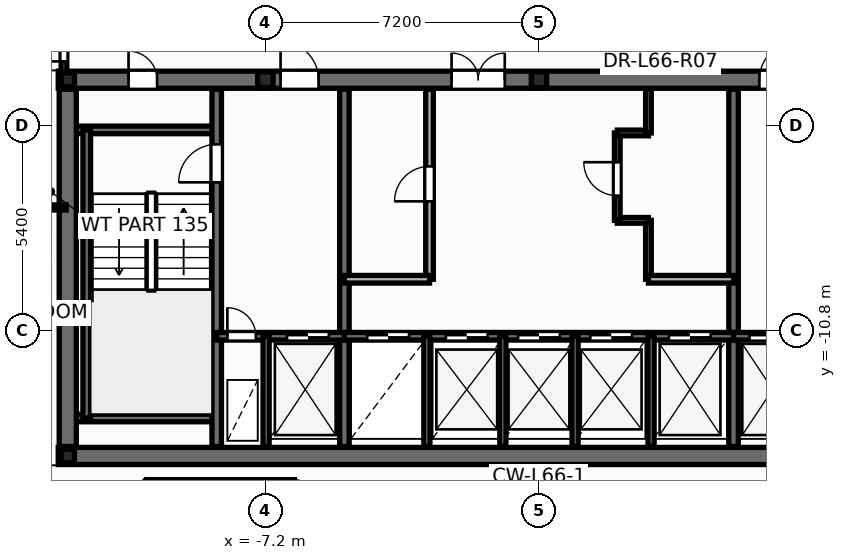
"""IFC4 building model, lengths in metres.
Left out: names, types, materials, properties, quantities, classifications, styles, units other than length and angle.
Written with IfcOpenShell. Run it as: python <this file> out.ifc"""

import sys

from ifc_helpers import new_model, si_unit, direction, frame, frame_2d, origin, origin_2d, place, context, subcontext, project, spatial, rectangle, i_section, extrude, element, fill, save


model = new_model("IFC4")
c1 = context("Model", 3, precision=1e-05, world=origin(), true_north=direction((0.0, 1.0)))
c2 = subcontext(c1, "Body", "Model", "MODEL_VIEW")
j1 = project(units=[si_unit("LENGTHUNIT", "METRE"), si_unit("PLANEANGLEUNIT", "RADIAN")], contexts=[c1])
p1 = place(None, origin())
s1 = spatial("IfcSite", under=j1, at=p1, CompositionType="ELEMENT")
p2 = place(p1, origin())
s2 = spatial("IfcBuilding", under=s1, at=p2, CompositionType="ELEMENT")
p3 = place(p2, frame((0.0, 0.0, 252.6)))
s3 = spatial("IfcBuildingStorey", under=s2, at=p3, CompositionType="ELEMENT", Elevation=252.6)
for number, where, z_axis, x_axis in (
    (1, (-12.4, -14.1, 0.0), (0.0, 0.0, 1.0), (1.0, 0.0, 0.0)),
    (2, (-12.4, -4.2, 0.0), (0.0, 0.0, 1.0), (1.0, 0.0, 0.0)),
):
    element("IfcColumn", number, at=place(p3, frame(where, z_axis=z_axis, x_axis=x_axis)), inside=s3, PredefinedType="COLUMN", context=c2, shape_type="SweptSolid", body=[
        extrude(i_section(OverallWidth=0.352, OverallDepth=0.359, WebThickness=0.018, FlangeThickness=0.026, at=origin_2d()), origin(), (0.0, 0.0, 1.0), 3.6),
    ])
for number, where, z_axis, x_axis in (
    (3, (-7.2, -4.2, 0.0), (0.0, 0.0, 1.0), (1.0, 0.0, 0.0)),
    (4, (0.0, -4.2, 0.0), (0.0, 0.0, 1.0), (1.0, 0.0, 0.0)),
):
    element("IfcColumn", number, at=place(p3, frame(where, z_axis=z_axis, x_axis=x_axis)), inside=s3, PredefinedType="PILASTER", context=c2, shape_type="SweptSolid", body=[
        extrude(i_section(OverallWidth=0.405, OverallDepth=0.414, WebThickness=0.022, FlangeThickness=0.032, at=origin_2d()), origin(), (0.0, 0.0, 1.0), 3.6),
    ])
p4 = place(p3, frame((2.88, -9.45, 0.0), z_axis=(0.0, 0.0, 1.0), x_axis=(0.0, 1.0, 0.0)))
e5 = element("IfcWall", 5, at=p4, inside=s3, PredefinedType="PARTITIONING", context=c2, shape_type="SweptSolid", body=[
    extrude(rectangle(XDim=1.55, YDim=0.15, at=frame_2d((0.775, 0.0))), origin(), (0.0, 0.0, 1.0), 3.345),
])
p5 = place(p3, frame((2.06, -7.9, 0.0), z_axis=(0.0, 0.0, 1.0), x_axis=(1.0, 0.0, 0.0)))
e6 = element("IfcWall", 6, at=p5, inside=s3, PredefinedType="PARTITIONING", context=c2, shape_type="SweptSolid", body=[
    extrude(rectangle(XDim=0.82, YDim=0.15, at=frame_2d((0.41, 0.0))), origin(), (0.0, 0.0, 1.0), 3.345),
])
p6 = place(p3, frame((2.06, -7.9, 0.0), z_axis=(0.0, 0.0, 1.0), x_axis=(0.0, 1.0, 0.0)))
e7 = element("IfcWall", 7, at=p6, inside=s3, PredefinedType="PARTITIONING", context=c2, shape_type="SweptSolid", body=[
    extrude(rectangle(XDim=2.3, YDim=0.15, at=frame_2d((1.15, 0.0))), origin(), (0.0, 0.0, 1.0), 3.345),
])
p7 = place(p6, frame((0.65, 0.0, 0.0)))
e8 = element("IfcOpeningElement", 8, at=p7, cuts=e7, PredefinedType="OPENING", context=c2, shape_type="SweptSolid", body=[
    extrude(rectangle(XDim=0.886, YDim=2.104, at=frame_2d((0.44, 1.052))), frame((0.0, 0.085, 0.0), z_axis=(0.0, -1.0, 0.0), x_axis=(1.0, 0.0, 0.0)), (0.0, 0.0, 1.0), 0.17),
])
p8 = place(p3, frame((2.06, -5.6, 0.0), z_axis=(0.0, 0.0, 1.0), x_axis=(1.0, 0.0, 0.0)))
e9 = element("IfcWall", 9, at=p8, inside=s3, PredefinedType="PARTITIONING", context=c2, shape_type="SweptSolid", body=[
    extrude(rectangle(XDim=0.82, YDim=0.15, at=frame_2d((0.41, 0.0))), origin(), (0.0, 0.0, 1.0), 3.345),
])
p9 = place(p3, frame((2.88, -5.6, 0.0), z_axis=(0.0, 0.0, 1.0), x_axis=(0.0, 1.0, 0.0)))
e10 = element("IfcWall", 10, at=p9, inside=s3, PredefinedType="PARTITIONING", context=c2, shape_type="SweptSolid", body=[
    extrude(rectangle(XDim=1.15, YDim=0.15, at=frame_2d((0.575, 0.0))), origin(), (0.0, 0.0, 1.0), 3.345),
])
p10 = place(p3, frame((-12.65, -14.1, 0.0), z_axis=(0.0, 0.0, 1.0), x_axis=(1.0, 0.0, 0.0)))
e11 = element("IfcWall", 11, at=p10, inside=s3, PredefinedType="SHEAR", context=c2, shape_type="SweptSolid", body=[
    extrude(rectangle(XDim=25.3, YDim=0.45, at=frame_2d((12.65, 0.0))), origin(), (0.0, 0.0, 1.0), 3.6),
])
p11 = place(p3, frame((-12.65, -4.2, 0.0), z_axis=(0.0, 0.0, 1.0), x_axis=(1.0, 0.0, 0.0)))
e12 = element("IfcWall", 12, at=p11, inside=s3, PredefinedType="SHEAR", context=c2, shape_type="SweptSolid", body=[
    extrude(rectangle(XDim=25.3, YDim=0.45, at=frame_2d((12.65, 0.0))), origin(), (0.0, 0.0, 1.0), 3.6),
])
p12 = place(p11, frame((1.85, 0.0, 0.0)))
e13 = element("IfcOpeningElement", 13, at=p12, cuts=e12, PredefinedType="OPENING", context=c2, shape_type="SweptSolid", body=[
    extrude(rectangle(XDim=0.756, YDim=2.054, at=frame_2d((0.375, 1.027))), frame((0.0, 0.235, 0.0), z_axis=(0.0, -1.0, 0.0), x_axis=(1.0, 0.0, 0.0)), (0.0, 0.0, 1.0), 0.47),
])
p13 = place(p11, frame((22.65, 0.0, 0.0)))
e14 = element("IfcOpeningElement", 14, at=p13, cuts=e12, PredefinedType="OPENING", context=c2, shape_type="SweptSolid", body=[
    extrude(rectangle(XDim=0.756, YDim=2.054, at=frame_2d((0.375, 1.027))), frame((0.0, 0.235, 0.0), z_axis=(0.0, -1.0, 0.0), x_axis=(1.0, 0.0, 0.0)), (0.0, 0.0, 1.0), 0.47),
])
p14 = place(p11, frame((5.85, 0.0, 0.0)))
e15 = element("IfcOpeningElement", 15, at=p14, cuts=e12, PredefinedType="OPENING", context=c2, shape_type="SweptSolid", body=[
    extrude(rectangle(XDim=1.006, YDim=2.104, at=frame_2d((0.5, 1.052))), frame((0.0, 0.235, 0.0), z_axis=(0.0, -1.0, 0.0), x_axis=(1.0, 0.0, 0.0)), (0.0, 0.0, 1.0), 0.47),
])
p15 = place(p11, frame((10.35, 0.0, 0.0)))
e16 = element("IfcOpeningElement", 16, at=p15, cuts=e12, PredefinedType="OPENING", context=c2, shape_type="SweptSolid", body=[
    extrude(rectangle(XDim=1.406, YDim=2.154, at=frame_2d((0.7, 1.077))), frame((0.0, 0.235, 0.0), z_axis=(0.0, -1.0, 0.0), x_axis=(1.0, 0.0, 0.0)), (0.0, 0.0, 1.0), 0.47),
])
p16 = place(p11, frame((18.45, 0.0, 0.0)))
e17 = element("IfcOpeningElement", 17, at=p16, cuts=e12, PredefinedType="OPENING", context=c2, shape_type="SweptSolid", body=[
    extrude(rectangle(XDim=1.006, YDim=2.104, at=frame_2d((0.5, 1.052))), frame((0.0, 0.235, 0.0), z_axis=(0.0, -1.0, 0.0), x_axis=(1.0, 0.0, 0.0)), (0.0, 0.0, 1.0), 0.47),
])
for number, where, z_axis, x_axis in (
    (18, (-12.35, -5.52, 0.0), (0.0, 0.0, 1.0), (1.0, 0.0, 0.0)),
    (19, (-12.35, -13.1, 0.0), (0.0, 0.0, 1.0), (1.0, 0.0, 0.0)),
):
    element("IfcWall", number, at=place(p3, frame(where, z_axis=z_axis, x_axis=x_axis)), inside=s3, PredefinedType="SOLIDWALL", context=c2, shape_type="SweptSolid", body=[
        extrude(rectangle(XDim=3.87, YDim=0.2, at=frame_2d((1.935, 0.0))), origin(), (0.0, 0.0, 1.0), 3.6),
    ])
p17 = place(p3, frame((-11.9, -13.1, 0.0), z_axis=(0.0, 0.0, 1.0), x_axis=(0.0, 1.0, 0.0)))
e20 = element("IfcWall", 20, at=p17, inside=s3, PredefinedType="SOLIDWALL", context=c2, shape_type="SweptSolid", body=[
    extrude(rectangle(XDim=7.58, YDim=0.2, at=frame_2d((3.79, 0.0))), origin(), (0.0, 0.0, 1.0), 3.6),
])
p18 = place(p3, frame((-8.48, -13.85, 0.0), z_axis=(0.0, 0.0, 1.0), x_axis=(0.0, 1.0, 0.0)))
e21 = element("IfcWall", 21, at=p18, inside=s3, PredefinedType="SHEAR", context=c2, shape_type="SweptSolid", body=[
    extrude(rectangle(XDim=9.4, YDim=0.25, at=frame_2d((4.7, 0.0))), origin(), (0.0, 0.0, 1.0), 3.6),
])
p19 = place(p18, frame((6.95, 0.0, 0.0)))
e22 = element("IfcOpeningElement", 22, at=p19, cuts=e21, PredefinedType="OPENING", context=c2, shape_type="SweptSolid", body=[
    extrude(rectangle(XDim=1.006, YDim=2.104, at=frame_2d((0.5, 1.052))), frame((0.0, 0.135, 0.0), z_axis=(0.0, -1.0, 0.0), x_axis=(1.0, 0.0, 0.0)), (0.0, 0.0, 1.0), 0.27),
])
for number, where, z_axis, x_axis in (
    (23, (-5.12, -13.85, 0.0), (0.0, 0.0, 1.0), (0.0, 1.0, 0.0)),
    (24, (5.12, -13.85, 0.0), (0.0, 0.0, 1.0), (0.0, 1.0, 0.0)),
):
    element("IfcWall", number, at=place(p3, frame(where, z_axis=z_axis, x_axis=x_axis)), inside=s3, PredefinedType="SHEAR", context=c2, shape_type="SweptSolid", body=[
        extrude(rectangle(XDim=9.4, YDim=0.25, at=frame_2d((4.7, 0.0))), origin(), (0.0, 0.0, 1.0), 3.6),
    ])
p20 = place(p3, frame((-8.48, -10.95, 0.0), z_axis=(0.0, 0.0, 1.0), x_axis=(1.0, 0.0, 0.0)))
e25 = element("IfcWall", 25, at=p20, inside=s3, PredefinedType="SOLIDWALL", context=c2, shape_type="SweptSolid", body=[
    extrude(rectangle(XDim=3.36, YDim=0.2, at=frame_2d((1.68, 0.0))), origin(), (0.0, 0.0, 1.0), 3.6),
])
p21 = place(p20, frame((0.28, 0.0, 0.0)))
e26 = element("IfcOpeningElement", 26, at=p21, cuts=e25, PredefinedType="OPENING", context=c2, shape_type="SweptSolid", body=[
    extrude(rectangle(XDim=0.756, YDim=2.054, at=frame_2d((0.375, 1.027))), frame((0.0, 0.11, 0.0), z_axis=(0.0, -1.0, 0.0), x_axis=(1.0, 0.0, 0.0)), (0.0, 0.0, 1.0), 0.22),
])
p22 = place(p20, frame((1.85, 0.0, 0.0)))
e27 = element("IfcOpeningElement", 27, at=p22, cuts=e25, PredefinedType="OPENING", context=c2, shape_type="SweptSolid", body=[
    extrude(rectangle(XDim=1.106, YDim=2.104, at=frame_2d((0.55, 1.052))), frame((0.0, 0.11, 0.0), z_axis=(0.0, -1.0, 0.0), x_axis=(1.0, 0.0, 0.0)), (0.0, 0.0, 1.0), 0.22),
])
p23 = place(p3, frame((-5.12, -10.95, 0.0), z_axis=(0.0, 0.0, 1.0), x_axis=(1.0, 0.0, 0.0)))
e28 = element("IfcWall", 28, at=p23, inside=s3, PredefinedType="SOLIDWALL", context=c2, shape_type="SweptSolid", body=[
    extrude(rectangle(XDim=10.24, YDim=0.2, at=frame_2d((5.12, 0.0))), origin(), (0.0, 0.0, 1.0), 3.6),
])
p24 = place(p23, frame((0.6, 0.0, 0.0)))
e29 = element("IfcOpeningElement", 29, at=p24, cuts=e28, PredefinedType="OPENING", context=c2, shape_type="SweptSolid", body=[
    extrude(rectangle(XDim=1.106, YDim=2.104, at=frame_2d((0.55, 1.052))), frame((0.0, 0.11, 0.0), z_axis=(0.0, -1.0, 0.0), x_axis=(1.0, 0.0, 0.0)), (0.0, 0.0, 1.0), 0.22),
])
p25 = place(p23, frame((2.67, 0.0, 0.0)))
e30 = element("IfcOpeningElement", 30, at=p25, cuts=e28, PredefinedType="OPENING", context=c2, shape_type="SweptSolid", body=[
    extrude(rectangle(XDim=1.106, YDim=2.104, at=frame_2d((0.55, 1.052))), frame((0.0, 0.11, 0.0), z_axis=(0.0, -1.0, 0.0), x_axis=(1.0, 0.0, 0.0)), (0.0, 0.0, 1.0), 0.22),
])
p26 = place(p23, frame((4.57, 0.0, 0.0)))
e31 = element("IfcOpeningElement", 31, at=p26, cuts=e28, PredefinedType="OPENING", context=c2, shape_type="SweptSolid", body=[
    extrude(rectangle(XDim=1.106, YDim=2.104, at=frame_2d((0.55, 1.052))), frame((0.0, 0.11, 0.0), z_axis=(0.0, -1.0, 0.0), x_axis=(1.0, 0.0, 0.0)), (0.0, 0.0, 1.0), 0.22),
])
p27 = place(p23, frame((6.47, 0.0, 0.0)))
e32 = element("IfcOpeningElement", 32, at=p27, cuts=e28, PredefinedType="OPENING", context=c2, shape_type="SweptSolid", body=[
    extrude(rectangle(XDim=1.106, YDim=2.104, at=frame_2d((0.55, 1.052))), frame((0.0, 0.11, 0.0), z_axis=(0.0, -1.0, 0.0), x_axis=(1.0, 0.0, 0.0)), (0.0, 0.0, 1.0), 0.22),
])
p28 = place(p23, frame((8.54, 0.0, 0.0)))
e33 = element("IfcOpeningElement", 33, at=p28, cuts=e28, PredefinedType="OPENING", context=c2, shape_type="SweptSolid", body=[
    extrude(rectangle(XDim=1.106, YDim=2.104, at=frame_2d((0.55, 1.052))), frame((0.0, 0.11, 0.0), z_axis=(0.0, -1.0, 0.0), x_axis=(1.0, 0.0, 0.0)), (0.0, 0.0, 1.0), 0.22),
])
p29 = place(p3, frame((5.12, -10.95, 0.0), z_axis=(0.0, 0.0, 1.0), x_axis=(1.0, 0.0, 0.0)))
e34 = element("IfcWall", 34, at=p29, inside=s3, PredefinedType="SOLIDWALL", context=c2, shape_type="SweptSolid", body=[
    extrude(rectangle(XDim=3.36, YDim=0.2, at=frame_2d((1.68, 0.0))), origin(), (0.0, 0.0, 1.0), 3.6),
])
p30 = place(p29, frame((0.42, 0.0, 0.0)))
e35 = element("IfcOpeningElement", 35, at=p30, cuts=e34, PredefinedType="OPENING", context=c2, shape_type="SweptSolid", body=[
    extrude(rectangle(XDim=1.106, YDim=2.104, at=frame_2d((0.55, 1.052))), frame((0.0, 0.11, 0.0), z_axis=(0.0, -1.0, 0.0), x_axis=(1.0, 0.0, 0.0)), (0.0, 0.0, 1.0), 0.22),
])
p31 = place(p29, frame((2.3, 0.0, 0.0)))
e36 = element("IfcOpeningElement", 36, at=p31, cuts=e34, PredefinedType="OPENING", context=c2, shape_type="SweptSolid", body=[
    extrude(rectangle(XDim=0.756, YDim=2.054, at=frame_2d((0.375, 1.027))), frame((0.0, 0.11, 0.0), z_axis=(0.0, -1.0, 0.0), x_axis=(1.0, 0.0, 0.0)), (0.0, 0.0, 1.0), 0.22),
])
for number, where, z_axis, x_axis in (
    (37, (-7.18, -13.85, 0.0), (0.0, 0.0, 1.0), (0.0, 1.0, 0.0)),
    (38, (-2.95, -13.85, 0.0), (0.0, 0.0, 1.0), (0.0, 1.0, 0.0)),
    (39, (2.95, -13.85, 0.0), (0.0, 0.0, 1.0), (0.0, 1.0, 0.0)),
):
    element("IfcWall", number, at=place(p3, frame(where, z_axis=z_axis, x_axis=x_axis)), inside=s3, PredefinedType="PARTITIONING", context=c2, shape_type="SweptSolid", body=[
        extrude(rectangle(XDim=2.9, YDim=0.16, at=frame_2d((1.45, 0.0))), origin(), (0.0, 0.0, 1.0), 2.57),
    ])
p32 = place(p3, frame((-12.4, -13.85, 0.0), z_axis=(0.0, 0.0, 1.0), x_axis=(0.0, 1.0, 0.0)))
e40 = element("IfcWall", 40, at=p32, inside=s3, PredefinedType="SHEAR", context=c2, shape_type="SweptSolid", body=[
    extrude(rectangle(XDim=9.4, YDim=0.45, at=frame_2d((4.7, 0.0))), origin(), (0.0, 0.0, 1.0), 3.6),
])
p33 = place(p3, frame((-2.88, -9.45, 0.0), z_axis=(0.0, 0.0, 1.0), x_axis=(0.0, 1.0, 0.0)))
e41 = element("IfcWall", 41, at=p33, inside=s3, PredefinedType="SOLIDWALL", context=c2, shape_type="SweptSolid", body=[
    extrude(rectangle(XDim=5.0, YDim=0.2, at=frame_2d((2.5, 0.0))), origin(), (0.0, 0.0, 1.0), 3.345),
])
p34 = place(p33, frame((2.05, 0.0, 0.0)))
e42 = element("IfcOpeningElement", 42, at=p34, cuts=e41, PredefinedType="OPENING", context=c2, shape_type="SweptSolid", body=[
    extrude(rectangle(XDim=0.926, YDim=2.104, at=frame_2d((0.46, 1.052))), frame((0.0, 0.11, 0.0), z_axis=(0.0, -1.0, 0.0), x_axis=(1.0, 0.0, 0.0)), (0.0, 0.0, 1.0), 0.22),
])
for number, where, z_axis, x_axis in (
    (43, (-5.12, -9.45, 0.0), (0.0, 0.0, 1.0), (1.0, 0.0, 0.0)),
    (44, (2.88, -9.45, 0.0), (0.0, 0.0, 1.0), (1.0, 0.0, 0.0)),
):
    element("IfcWall", number, at=place(p3, frame(where, z_axis=z_axis, x_axis=x_axis)), inside=s3, PredefinedType="SOLIDWALL", context=c2, shape_type="SweptSolid", body=[
        extrude(rectangle(XDim=2.24, YDim=0.2, at=frame_2d((1.12, 0.0))), origin(), (0.0, 0.0, 1.0), 3.345),
    ])
for number, where, z_axis, x_axis in (
    (45, (-0.95, -13.85, 0.0), (0.0, 0.0, 1.0), (0.0, 1.0, 0.0)),
    (46, (0.95, -13.85, 0.0), (0.0, 0.0, 1.0), (0.0, 1.0, 0.0)),
):
    element("IfcWall", number, at=place(p3, frame(where, z_axis=z_axis, x_axis=x_axis)), inside=s3, PredefinedType="PARTITIONING", context=c2, shape_type="SweptSolid", body=[
        extrude(rectangle(XDim=2.9, YDim=0.16, at=frame_2d((1.45, 0.0))), origin(), (0.0, 0.0, 1.0), 2.57),
    ])
p35 = place(p3, frame((-10.321, -14.783, 0.0), z_axis=(0.0, 0.0, 1.0), x_axis=(1.0, 0.0, 0.0)))
e47 = element("IfcWall", 47, at=p35, inside=s3, PredefinedType="PARTITIONING", context=c2, shape_type="SweptSolid", body=[
    extrude(rectangle(XDim=3.886, YDim=0.12, at=frame_2d((1.943, 0.0))), origin(), (0.0, 0.0, 1.0), 3.345),
])
p36 = place(p3, frame((-15.2, -7.56, 0.0), z_axis=(0.0, 0.0, 1.0), x_axis=(1.0, 0.0, 0.0)))
e48 = element("IfcWall", 48, at=p36, inside=s3, PredefinedType="PARTITIONING", context=c2, shape_type="SweptSolid", body=[
    extrude(rectangle(XDim=2.76, YDim=0.135, at=frame_2d((1.38, 0.0))), origin(), (0.0, 0.0, 1.0), 2.863),
])
p37 = place(p36, frame((0.394, 0.0, 0.0)))
e49 = element("IfcOpeningElement", 49, at=p37, cuts=e48, PredefinedType="OPENING", context=c2, shape_type="SweptSolid", body=[
    extrude(rectangle(XDim=0.856, YDim=2.104, at=frame_2d((0.425, 1.052))), frame((0.0, 0.078, 0.0), z_axis=(0.0, -1.0, 0.0), x_axis=(1.0, 0.0, 0.0)), (0.0, 0.0, 1.0), 0.155),
])
p38 = place(p3, frame((-15.16, -10.3, 0.0), z_axis=(0.0, 0.0, 1.0), x_axis=(1.0, 0.0, 0.0)))
e50 = element("IfcWall", 50, at=p38, inside=s3, PredefinedType="PARTITIONING", context=c2, shape_type="SweptSolid", body=[
    extrude(rectangle(XDim=2.72, YDim=0.135, at=frame_2d((1.36, 0.0))), origin(), (0.0, 0.0, 1.0), 2.863),
])
p39 = place(p3, frame((-12.5, -4.24, 0.0), z_axis=(0.0, 0.0, 1.0), x_axis=(0.0, 1.0, 0.0)))
e51 = element("IfcWall", 51, at=p39, inside=s3, PredefinedType="PARTITIONING", context=c2, shape_type="SweptSolid", body=[
    extrude(rectangle(XDim=1.48, YDim=0.15, at=frame_2d((0.74, 0.0))), origin(), (0.0, 0.0, 1.0), 2.32),
])
p40 = place(p39, frame((0.522, 0.0, 0.0)))
e52 = element("IfcOpeningElement", 52, at=p40, cuts=e51, PredefinedType="OPENING", context=c2, shape_type="SweptSolid", body=[
    extrude(rectangle(XDim=0.826, YDim=2.104, at=frame_2d((0.41, 1.052))), frame((0.0, 0.085, 0.0), z_axis=(0.0, -1.0, 0.0), x_axis=(1.0, 0.0, 0.0)), (0.0, 0.0, 1.0), 0.17),
])
p41 = place(p3, frame((-10.873, -15.453, 0.0), z_axis=(0.0, 0.0, 1.0), x_axis=(0.636111126851, 0.771597456123, 0.0)))
e53 = element("IfcWall", 53, at=p41, inside=s3, PredefinedType="PARTITIONING", context=c2, shape_type="SweptSolid", body=[
    extrude(rectangle(XDim=0.869, YDim=0.12, at=frame_2d((0.434, 0.0))), origin(), (0.0, 0.0, 1.0), 2.863),
])
p42 = place(p34, origin())
e54 = element("IfcDoor", 54, at=p42, inside=s3, OperationType="SINGLE_SWING_LEFT", PredefinedType="DOOR", context=c2, shape_type="SweptSolid", body=[
    extrude(rectangle(XDim=0.92, YDim=2.1, at=frame_2d((0.46, 1.05))), frame((0.0, 0.025, 0.0), z_axis=(0.0, -1.0, 0.0), x_axis=(1.0, 0.0, 0.0)), (0.0, 0.0, 1.0), 0.05),
])
fill(e42, e54)
p43 = place(p7, origin())
e55 = element("IfcDoor", 55, at=p43, inside=s3, OperationType="SINGLE_SWING_RIGHT", PredefinedType="DOOR", context=c2, shape_type="SweptSolid", body=[
    extrude(rectangle(XDim=0.88, YDim=2.1, at=frame_2d((0.44, 1.05))), frame((0.0, 0.025, 0.0), z_axis=(0.0, -1.0, 0.0), x_axis=(1.0, 0.0, 0.0)), (0.0, 0.0, 1.0), 0.05),
])
fill(e8, e55)
p44 = place(p19, origin())
e56 = element("IfcDoor", 56, at=p44, inside=s3, OperationType="SINGLE_SWING_LEFT", PredefinedType="DOOR", context=c2, shape_type="SweptSolid", body=[
    extrude(rectangle(XDim=1.0, YDim=2.1, at=frame_2d((0.5, 1.05))), frame((0.0, 0.025, 0.0), z_axis=(0.0, -1.0, 0.0), x_axis=(1.0, 0.0, 0.0)), (0.0, 0.0, 1.0), 0.05),
])
fill(e22, e56)
p45 = place(p21, origin())
e57 = element("IfcDoor", 57, at=p45, inside=s3, OperationType="SINGLE_SWING_LEFT", PredefinedType="DOOR", context=c2, shape_type="SweptSolid", body=[
    extrude(rectangle(XDim=0.75, YDim=2.05, at=frame_2d((0.375, 1.025))), frame((0.0, 0.025, 0.0), z_axis=(0.0, -1.0, 0.0), x_axis=(1.0, 0.0, 0.0)), (0.0, 0.0, 1.0), 0.05),
])
fill(e26, e57)
p46 = place(p22, origin())
e58 = element("IfcDoor", 58, at=p46, inside=s3, OperationType="DOUBLE_DOOR_SLIDING", PredefinedType="DOOR", context=c2, shape_type="SweptSolid", body=[
    extrude(rectangle(XDim=1.1, YDim=2.1, at=frame_2d((0.55, 1.05))), frame((0.0, 0.025, 0.0), z_axis=(0.0, -1.0, 0.0), x_axis=(1.0, 0.0, 0.0)), (0.0, 0.0, 1.0), 0.05),
])
fill(e27, e58)
p47 = place(p30, origin())
e59 = element("IfcDoor", 59, at=p47, inside=s3, OperationType="DOUBLE_DOOR_SLIDING", PredefinedType="DOOR", context=c2, shape_type="SweptSolid", body=[
    extrude(rectangle(XDim=1.1, YDim=2.1, at=frame_2d((0.55, 1.05))), frame((0.0, 0.025, 0.0), z_axis=(0.0, -1.0, 0.0), x_axis=(1.0, 0.0, 0.0)), (0.0, 0.0, 1.0), 0.05),
])
fill(e35, e59)
p48 = place(p24, origin())
e60 = element("IfcDoor", 60, at=p48, inside=s3, OperationType="DOUBLE_DOOR_SLIDING", PredefinedType="DOOR", context=c2, shape_type="SweptSolid", body=[
    extrude(rectangle(XDim=1.1, YDim=2.1, at=frame_2d((0.55, 1.05))), frame((0.0, 0.025, 0.0), z_axis=(0.0, -1.0, 0.0), x_axis=(1.0, 0.0, 0.0)), (0.0, 0.0, 1.0), 0.05),
])
fill(e29, e60)
p49 = place(p25, origin())
e61 = element("IfcDoor", 61, at=p49, inside=s3, OperationType="DOUBLE_DOOR_SLIDING", PredefinedType="DOOR", context=c2, shape_type="SweptSolid", body=[
    extrude(rectangle(XDim=1.1, YDim=2.1, at=frame_2d((0.55, 1.05))), frame((0.0, 0.025, 0.0), z_axis=(0.0, -1.0, 0.0), x_axis=(1.0, 0.0, 0.0)), (0.0, 0.0, 1.0), 0.05),
])
fill(e30, e61)
p50 = place(p26, origin())
e62 = element("IfcDoor", 62, at=p50, inside=s3, OperationType="DOUBLE_DOOR_SLIDING", PredefinedType="DOOR", context=c2, shape_type="SweptSolid", body=[
    extrude(rectangle(XDim=1.1, YDim=2.1, at=frame_2d((0.55, 1.05))), frame((0.0, 0.025, 0.0), z_axis=(0.0, -1.0, 0.0), x_axis=(1.0, 0.0, 0.0)), (0.0, 0.0, 1.0), 0.05),
])
fill(e31, e62)
p51 = place(p27, origin())
e63 = element("IfcDoor", 63, at=p51, inside=s3, OperationType="DOUBLE_DOOR_SLIDING", PredefinedType="DOOR", context=c2, shape_type="SweptSolid", body=[
    extrude(rectangle(XDim=1.1, YDim=2.1, at=frame_2d((0.55, 1.05))), frame((0.0, 0.025, 0.0), z_axis=(0.0, -1.0, 0.0), x_axis=(1.0, 0.0, 0.0)), (0.0, 0.0, 1.0), 0.05),
])
fill(e32, e63)
p52 = place(p28, origin())
e64 = element("IfcDoor", 64, at=p52, inside=s3, OperationType="DOUBLE_DOOR_SLIDING", PredefinedType="DOOR", context=c2, shape_type="SweptSolid", body=[
    extrude(rectangle(XDim=1.1, YDim=2.1, at=frame_2d((0.55, 1.05))), frame((0.0, 0.025, 0.0), z_axis=(0.0, -1.0, 0.0), x_axis=(1.0, 0.0, 0.0)), (0.0, 0.0, 1.0), 0.05),
])
fill(e33, e64)
p53 = place(p12, origin())
e65 = element("IfcDoor", 65, at=p53, inside=s3, OperationType="SINGLE_SWING_LEFT", PredefinedType="DOOR", context=c2, shape_type="SweptSolid", body=[
    extrude(rectangle(XDim=0.75, YDim=2.05, at=frame_2d((0.375, 1.025))), frame((0.0, 0.025, 0.0), z_axis=(0.0, -1.0, 0.0), x_axis=(1.0, 0.0, 0.0)), (0.0, 0.0, 1.0), 0.05),
])
fill(e13, e65)
p54 = place(p14, origin())
e66 = element("IfcDoor", 66, at=p54, inside=s3, OperationType="SINGLE_SWING_LEFT", PredefinedType="DOOR", context=c2, shape_type="SweptSolid", body=[
    extrude(rectangle(XDim=1.0, YDim=2.1, at=frame_2d((0.5, 1.05))), frame((0.0, 0.025, 0.0), z_axis=(0.0, -1.0, 0.0), x_axis=(1.0, 0.0, 0.0)), (0.0, 0.0, 1.0), 0.05),
])
fill(e15, e66)
p55 = place(p15, origin())
e67 = element("IfcDoor", 67, at=p55, inside=s3, OperationType="DOUBLE_DOOR_SINGLE_SWING", PredefinedType="DOOR", context=c2, shape_type="SweptSolid", body=[
    extrude(rectangle(XDim=1.4, YDim=2.15, at=frame_2d((0.7, 1.075))), frame((0.0, 0.025, 0.0), z_axis=(0.0, -1.0, 0.0), x_axis=(1.0, 0.0, 0.0)), (0.0, 0.0, 1.0), 0.05),
])
fill(e16, e67)
p56 = place(p16, origin())
e68 = element("IfcDoor", 68, at=p56, inside=s3, OperationType="SINGLE_SWING_RIGHT", PredefinedType="DOOR", context=c2, shape_type="SweptSolid", body=[
    extrude(rectangle(XDim=1.0, YDim=2.1, at=frame_2d((0.5, 1.05))), frame((0.0, 0.025, 0.0), z_axis=(0.0, -1.0, 0.0), x_axis=(1.0, 0.0, 0.0)), (0.0, 0.0, 1.0), 0.05),
])
fill(e17, e68)
p57 = place(p40, origin())
e69 = element("IfcDoor", 69, at=p57, inside=s3, OperationType="SINGLE_SWING_LEFT", PredefinedType="DOOR", context=c2, shape_type="SweptSolid", body=[
    extrude(rectangle(XDim=0.82, YDim=2.1, at=frame_2d((0.41, 1.05))), frame((0.0, 0.025, 0.0), z_axis=(0.0, -1.0, 0.0), x_axis=(1.0, 0.0, 0.0)), (0.0, 0.0, 1.0), 0.05),
])
fill(e52, e69)
save(model, sys.argv[1])
